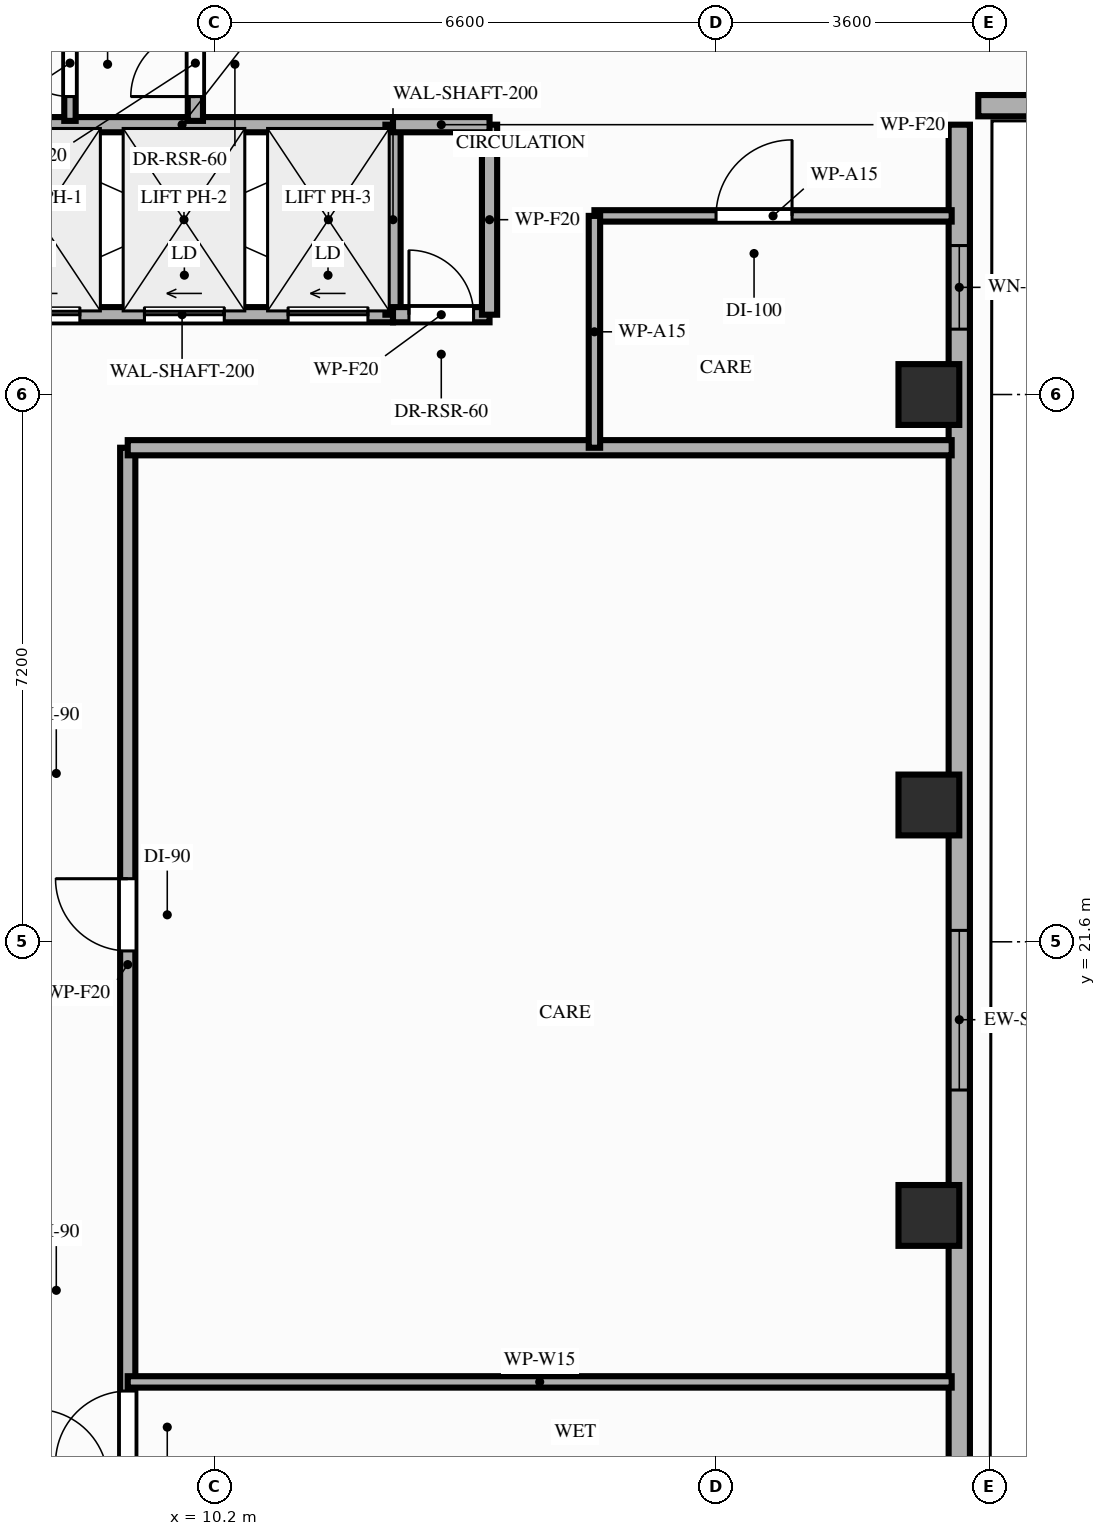
"""IFC4 building model, lengths in metres.
Left out: names, types, materials, properties, quantities, classifications, styles, units other than length and angle.
Written with IfcOpenShell. Run it as: python <this file> out.ifc"""

import sys

from ifc_helpers import new_model, si_unit, direction, frame, frame_2d, origin, origin_2d, place, context, subcontext, project, spatial, rectangle, extrude, element, fill, save


model = new_model("IFC4")
c1 = context("Model", 3, precision=1e-05, world=origin(), true_north=direction((0.0, 1.0)))
c2 = subcontext(c1, "Body", "Model", "MODEL_VIEW")
j1 = project(units=[si_unit("LENGTHUNIT", "METRE"), si_unit("PLANEANGLEUNIT", "RADIAN")], contexts=[c1])
p1 = place(None, origin())
s1 = spatial("IfcSite", under=j1, at=p1, CompositionType="ELEMENT")
p2 = place(p1, origin())
s2 = spatial("IfcBuilding", under=s1, at=p2, CompositionType="ELEMENT")
p3 = place(p2, frame((0.0, 0.0, 231.2)))
s3 = spatial("IfcBuildingStorey", under=s2, at=p3, CompositionType="ELEMENT", Elevation=231.2)
for number, where, z_axis, x_axis in (
    (1, (19.6, 18.0, 0.0), (0.0, 0.0, 1.0), (1.0, 0.0, 0.0)),
    (2, (19.6, 23.4, 0.0), (0.0, 0.0, 1.0), (1.0, 0.0, 0.0)),
    (3, (19.6, 28.8, 0.0), (0.0, 0.0, 1.0), (1.0, 0.0, 0.0)),
):
    element("IfcColumn", number, at=place(p3, frame(where, z_axis=z_axis, x_axis=x_axis)), inside=s3, PredefinedType="COLUMN", context=c2, shape_type="SweptSolid", body=[
        extrude(rectangle(XDim=0.8, YDim=0.8, at=origin_2d()), origin(), (0.0, 0.0, 1.0), 3.2),
    ])
p4 = place(p3, frame((20.0, 8.8, 0.0), z_axis=(0.0, 0.0, 1.0), x_axis=(0.0, 1.0, 0.0)))
e4 = element("IfcWall", 4, at=p4, inside=s3, PredefinedType="STANDARD", context=c2, shape_type="SweptSolid", body=[
    extrude(rectangle(XDim=23.55, YDim=0.28, at=frame_2d((11.775, 0.0))), origin(), (0.0, 0.0, 1.0), 2.56),
])
p5 = place(p4, frame((20.86, 0.0, 0.85)))
e5 = element("IfcOpeningElement", 5, at=p5, cuts=e4, PredefinedType="OPENING", context=c2, shape_type="SweptSolid", body=[
    extrude(rectangle(XDim=1.1, YDim=1.46, at=frame_2d((0.55, 0.73))), frame((0.0, 0.15, 0.0), z_axis=(0.0, -1.0, 0.0), x_axis=(1.0, 0.0, 0.0)), (0.0, 0.0, 1.0), 0.3),
])
p6 = place(p4, frame((4.58, 0.0, 0.85)))
e6 = element("IfcOpeningElement", 6, at=p6, cuts=e4, PredefinedType="OPENING", context=c2, shape_type="SweptSolid", body=[
    extrude(rectangle(XDim=0.8, YDim=1.46, at=frame_2d((0.4, 0.73))), frame((0.0, 0.15, 0.0), z_axis=(0.0, -1.0, 0.0), x_axis=(1.0, 0.0, 0.0)), (0.0, 0.0, 1.0), 0.3),
])
p7 = place(p4, frame((10.85, 0.0, 0.85)))
e7 = element("IfcOpeningElement", 7, at=p7, cuts=e4, PredefinedType="OPENING", context=c2, shape_type="SweptSolid", body=[
    extrude(rectangle(XDim=2.1, YDim=1.46, at=frame_2d((1.05, 0.73))), frame((0.0, 0.15, 0.0), z_axis=(0.0, -1.0, 0.0), x_axis=(1.0, 0.0, 0.0)), (0.0, 0.0, 1.0), 0.3),
])
p8 = place(p3, frame((20.25, 32.6, 0.0), z_axis=(0.0, 0.0, 1.0), x_axis=(1.0, 0.0, 0.0)))
e8 = element("IfcWall", 8, at=p8, inside=s3, PredefinedType="STANDARD", context=c2, shape_type="SweptSolid", body=[
    extrude(rectangle(XDim=7.35, YDim=0.28, at=frame_2d((3.675, 0.0))), origin(), (0.0, 0.0, 1.0), 2.56),
])
p9 = place(p3, frame((7.0, 29.85, 0.0), z_axis=(0.0, 0.0, 1.0), x_axis=(1.0, 0.0, 0.0)))
e9 = element("IfcWall", 9, at=p9, inside=s3, PredefinedType="MOVABLE", context=c2, shape_type="SweptSolid", body=[
    extrude(rectangle(XDim=5.55, YDim=0.2, at=frame_2d((2.775, 0.0))), origin(), (0.0, 0.0, 1.0), 3.02),
])
p10 = place(p9, frame((0.38, 0.0, 0.0)))
e10 = element("IfcOpeningElement", 10, at=p10, cuts=e9, PredefinedType="OPENING", context=c2, shape_type="SweptSolid", body=[
    extrude(rectangle(XDim=1.05, YDim=2.15, at=frame_2d((0.525, 1.075))), frame((0.0, 0.11, 0.0), z_axis=(0.0, -1.0, 0.0), x_axis=(1.0, 0.0, 0.0)), (0.0, 0.0, 1.0), 0.22),
])
p11 = place(p9, frame((2.28, 0.0, 0.0)))
e11 = element("IfcOpeningElement", 11, at=p11, cuts=e9, PredefinedType="OPENING", context=c2, shape_type="SweptSolid", body=[
    extrude(rectangle(XDim=1.05, YDim=2.15, at=frame_2d((0.525, 1.075))), frame((0.0, 0.11, 0.0), z_axis=(0.0, -1.0, 0.0), x_axis=(1.0, 0.0, 0.0)), (0.0, 0.0, 1.0), 0.22),
])
p12 = place(p9, frame((4.17, 0.0, 0.0)))
e12 = element("IfcOpeningElement", 12, at=p12, cuts=e9, PredefinedType="OPENING", context=c2, shape_type="SweptSolid", body=[
    extrude(rectangle(XDim=1.05, YDim=2.15, at=frame_2d((0.525, 1.075))), frame((0.0, 0.11, 0.0), z_axis=(0.0, -1.0, 0.0), x_axis=(1.0, 0.0, 0.0)), (0.0, 0.0, 1.0), 0.22),
])
p13 = place(p3, frame((7.0, 32.35, 0.0), z_axis=(0.0, 0.0, 1.0), x_axis=(1.0, 0.0, 0.0)))
e13 = element("IfcWall", 13, at=p13, inside=s3, PredefinedType="MOVABLE", context=c2, shape_type="SweptSolid", body=[
    extrude(rectangle(XDim=5.55, YDim=0.2, at=frame_2d((2.775, 0.0))), origin(), (0.0, 0.0, 1.0), 3.02),
])
p14 = place(p3, frame((12.55, 29.85, 0.0), z_axis=(0.0, 0.0, 1.0), x_axis=(0.0, 1.0, 0.0)))
e14 = element("IfcWall", 14, at=p14, inside=s3, PredefinedType="MOVABLE", context=c2, shape_type="SweptSolid", body=[
    extrude(rectangle(XDim=2.5, YDim=0.2, at=frame_2d((1.25, 0.0))), origin(), (0.0, 0.0, 1.0), 3.02),
])
p15 = place(p3, frame((9.95, 32.4, 0.0), z_axis=(0.0, 0.0, 1.0), x_axis=(0.0, 1.0, 0.0)))
e15 = element("IfcWall", 15, at=p15, inside=s3, PredefinedType="PARTITIONING", context=c2, shape_type="SweptSolid", body=[
    extrude(rectangle(XDim=1.52, YDim=0.2, at=frame_2d((0.76, 0.0))), origin(), (0.0, 0.0, 1.0), 2.56),
])
p16 = place(p15, frame((0.32, 0.0, 0.0)))
e16 = element("IfcOpeningElement", 16, at=p16, cuts=e15, PredefinedType="OPENING", context=c2, shape_type="SweptSolid", body=[
    extrude(rectangle(XDim=0.85, YDim=2.05, at=frame_2d((0.425, 1.025))), frame((0.0, 0.11, 0.0), z_axis=(0.0, -1.0, 0.0), x_axis=(1.0, 0.0, 0.0)), (0.0, 0.0, 1.0), 0.22),
])
p17 = place(p3, frame((8.3, 32.4, 0.0), z_axis=(0.0, 0.0, 1.0), x_axis=(0.0, 1.0, 0.0)))
e17 = element("IfcWall", 17, at=p17, inside=s3, PredefinedType="PARTITIONING", context=c2, shape_type="SweptSolid", body=[
    extrude(rectangle(XDim=1.52, YDim=0.15, at=frame_2d((0.76, 0.0))), origin(), (0.0, 0.0, 1.0), 2.56),
])
p18 = place(p17, frame((0.32, 0.0, 0.0)))
e18 = element("IfcOpeningElement", 18, at=p18, cuts=e17, PredefinedType="OPENING", context=c2, shape_type="SweptSolid", body=[
    extrude(rectangle(XDim=0.85, YDim=2.05, at=frame_2d((0.425, 1.025))), frame((0.0, 0.085, 0.0), z_axis=(0.0, -1.0, 0.0), x_axis=(1.0, 0.0, 0.0)), (0.0, 0.0, 1.0), 0.17),
])
p19 = place(p3, frame((12.55, 29.85, 0.0), z_axis=(0.0, 0.0, 1.0), x_axis=(1.0, 0.0, 0.0)))
e19 = element("IfcWall", 19, at=p19, inside=s3, PredefinedType="PARTITIONING", context=c2, shape_type="SweptSolid", body=[
    extrude(rectangle(XDim=1.27, YDim=0.2, at=frame_2d((0.635, 0.0))), origin(), (0.0, 0.0, 1.0), 3.02),
])
p20 = place(p19, frame((0.21, 0.0, 0.0)))
e20 = element("IfcOpeningElement", 20, at=p20, cuts=e19, PredefinedType="OPENING", context=c2, shape_type="SweptSolid", body=[
    extrude(rectangle(XDim=0.85, YDim=2.05, at=frame_2d((0.425, 1.025))), frame((0.0, 0.11, 0.0), z_axis=(0.0, -1.0, 0.0), x_axis=(1.0, 0.0, 0.0)), (0.0, 0.0, 1.0), 0.22),
])
p21 = place(p3, frame((13.82, 29.85, 0.0), z_axis=(0.0, 0.0, 1.0), x_axis=(0.0, 1.0, 0.0)))
e21 = element("IfcWall", 21, at=p21, inside=s3, PredefinedType="PARTITIONING", context=c2, shape_type="SweptSolid", body=[
    extrude(rectangle(XDim=2.5, YDim=0.2, at=frame_2d((1.25, 0.0))), origin(), (0.0, 0.0, 1.0), 3.02),
])
p22 = place(p3, frame((12.55, 32.35, 0.0), z_axis=(0.0, 0.0, 1.0), x_axis=(1.0, 0.0, 0.0)))
e22 = element("IfcWall", 22, at=p22, inside=s3, PredefinedType="PARTITIONING", context=c2, shape_type="SweptSolid", body=[
    extrude(rectangle(XDim=1.27, YDim=0.2, at=frame_2d((0.635, 0.0))), origin(), (0.0, 0.0, 1.0), 3.02),
])
p23 = place(p3, frame((9.06, 14.5, 0.0), z_axis=(0.0, 0.0, 1.0), x_axis=(0.0, 1.0, 0.0)))
e23 = element("IfcWall", 23, at=p23, inside=s3, PredefinedType="PARTITIONING", context=c2, shape_type="SweptSolid", body=[
    extrude(rectangle(XDim=13.6, YDim=0.2, at=frame_2d((6.8, 0.0))), origin(), (0.0, 0.0, 1.0), 2.56),
])
p24 = place(p23, frame((0.24, 0.0, 0.0)))
e24 = element("IfcOpeningElement", 24, at=p24, cuts=e23, PredefinedType="OPENING", context=c2, shape_type="SweptSolid", body=[
    extrude(rectangle(XDim=0.95, YDim=2.1, at=frame_2d((0.475, 1.05))), frame((0.0, 0.11, 0.0), z_axis=(0.0, -1.0, 0.0), x_axis=(1.0, 0.0, 0.0)), (0.0, 0.0, 1.0), 0.22),
])
p25 = place(p23, frame((6.98, 0.0, 0.0)))
e25 = element("IfcOpeningElement", 25, at=p25, cuts=e23, PredefinedType="OPENING", context=c2, shape_type="SweptSolid", body=[
    extrude(rectangle(XDim=0.95, YDim=2.15, at=frame_2d((0.475, 1.075))), frame((0.0, 0.11, 0.0), z_axis=(0.0, -1.0, 0.0), x_axis=(1.0, 0.0, 0.0)), (0.0, 0.0, 1.0), 0.22),
])
p26 = place(p3, frame((9.06, 28.1, 0.0), z_axis=(0.0, 0.0, 1.0), x_axis=(1.0, 0.0, 0.0)))
e26 = element("IfcWall", 26, at=p26, inside=s3, PredefinedType="PARTITIONING", context=c2, shape_type="SweptSolid", body=[
    extrude(rectangle(XDim=10.84, YDim=0.2, at=frame_2d((5.42, 0.0))), origin(), (0.0, 0.0, 1.0), 2.56),
])
p27 = place(p3, frame((15.2, 31.15, 0.0), z_axis=(0.0, 0.0, 1.0), x_axis=(1.0, 0.0, 0.0)))
e27 = element("IfcWall", 27, at=p27, inside=s3, PredefinedType="PARTITIONING", context=c2, shape_type="SweptSolid", body=[
    extrude(rectangle(XDim=4.7, YDim=0.15, at=frame_2d((2.35, 0.0))), origin(), (0.0, 0.0, 1.0), 2.56),
])
p28 = place(p27, frame((1.6, 0.0, 0.0)))
e28 = element("IfcOpeningElement", 28, at=p28, cuts=e27, PredefinedType="OPENING", context=c2, shape_type="SweptSolid", body=[
    extrude(rectangle(XDim=1.0, YDim=2.15, at=frame_2d((0.5, 1.075))), frame((0.0, 0.085, 0.0), z_axis=(0.0, -1.0, 0.0), x_axis=(1.0, 0.0, 0.0)), (0.0, 0.0, 1.0), 0.17),
])
p29 = place(p3, frame((15.2, 28.1, 0.0), z_axis=(0.0, 0.0, 1.0), x_axis=(0.0, 1.0, 0.0)))
e29 = element("IfcWall", 29, at=p29, inside=s3, PredefinedType="PARTITIONING", context=c2, shape_type="SweptSolid", body=[
    extrude(rectangle(XDim=3.05, YDim=0.15, at=frame_2d((1.525, 0.0))), origin(), (0.0, 0.0, 1.0), 2.56),
])
p30 = place(p3, frame((9.06, 15.81, 0.0), z_axis=(0.0, 0.0, 1.0), x_axis=(1.0, 0.0, 0.0)))
e30 = element("IfcWall", 30, at=p30, inside=s3, PredefinedType="PARTITIONING", context=c2, shape_type="SweptSolid", body=[
    extrude(rectangle(XDim=10.84, YDim=0.15, at=frame_2d((5.42, 0.0))), origin(), (0.0, 0.0, 1.0), 2.56),
])
p31 = place(p5, origin())
e31 = element("IfcWindow", 31, at=p31, inside=s3, PartitioningType="SINGLE_PANEL", PredefinedType="WINDOW", context=c2, shape_type="SweptSolid", body=[
    extrude(rectangle(XDim=1.1, YDim=1.46, at=frame_2d((0.55, 0.73))), frame((0.0, 0.03, 0.0), z_axis=(0.0, -1.0, 0.0), x_axis=(1.0, 0.0, 0.0)), (0.0, 0.0, 1.0), 0.06),
])
fill(e5, e31)
p32 = place(p7, origin())
e32 = element("IfcWindow", 32, at=p32, inside=s3, PartitioningType="SINGLE_PANEL", PredefinedType="WINDOW", context=c2, shape_type="SweptSolid", body=[
    extrude(rectangle(XDim=2.1, YDim=1.46, at=frame_2d((1.05, 0.73))), frame((0.0, 0.03, 0.0), z_axis=(0.0, -1.0, 0.0), x_axis=(1.0, 0.0, 0.0)), (0.0, 0.0, 1.0), 0.06),
])
fill(e7, e32)
p33 = place(p10, origin())
e33 = element("IfcDoor", 33, at=p33, inside=s3, OperationType="SLIDING_TO_LEFT", PredefinedType="DOOR", context=c2, shape_type="SweptSolid", body=[
    extrude(rectangle(XDim=1.05, YDim=2.15, at=frame_2d((0.525, 1.075))), frame((0.0, 0.025, 0.0), z_axis=(0.0, -1.0, 0.0), x_axis=(1.0, 0.0, 0.0)), (0.0, 0.0, 1.0), 0.05),
])
fill(e10, e33)
p34 = place(p11, origin())
e34 = element("IfcDoor", 34, at=p34, inside=s3, OperationType="SLIDING_TO_LEFT", PredefinedType="DOOR", context=c2, shape_type="SweptSolid", body=[
    extrude(rectangle(XDim=1.05, YDim=2.15, at=frame_2d((0.525, 1.075))), frame((0.0, 0.025, 0.0), z_axis=(0.0, -1.0, 0.0), x_axis=(1.0, 0.0, 0.0)), (0.0, 0.0, 1.0), 0.05),
])
fill(e11, e34)
p35 = place(p12, origin())
e35 = element("IfcDoor", 35, at=p35, inside=s3, OperationType="SLIDING_TO_LEFT", PredefinedType="DOOR", context=c2, shape_type="SweptSolid", body=[
    extrude(rectangle(XDim=1.05, YDim=2.15, at=frame_2d((0.525, 1.075))), frame((0.0, 0.025, 0.0), z_axis=(0.0, -1.0, 0.0), x_axis=(1.0, 0.0, 0.0)), (0.0, 0.0, 1.0), 0.05),
])
fill(e12, e35)
p36 = place(p16, origin())
e36 = element("IfcDoor", 36, at=p36, inside=s3, OperationType="SINGLE_SWING_LEFT", PredefinedType="DOOR", context=c2, shape_type="SweptSolid", body=[
    extrude(rectangle(XDim=0.85, YDim=2.05, at=frame_2d((0.425, 1.025))), frame((0.0, 0.025, 0.0), z_axis=(0.0, -1.0, 0.0), x_axis=(1.0, 0.0, 0.0)), (0.0, 0.0, 1.0), 0.05),
])
fill(e16, e36)
p37 = place(p18, origin())
e37 = element("IfcDoor", 37, at=p37, inside=s3, OperationType="SINGLE_SWING_RIGHT", PredefinedType="DOOR", context=c2, shape_type="SweptSolid", body=[
    extrude(rectangle(XDim=0.85, YDim=2.05, at=frame_2d((0.425, 1.025))), frame((0.0, 0.025, 0.0), z_axis=(0.0, -1.0, 0.0), x_axis=(1.0, 0.0, 0.0)), (0.0, 0.0, 1.0), 0.05),
])
fill(e18, e37)
p38 = place(p20, origin())
e38 = element("IfcDoor", 38, at=p38, inside=s3, OperationType="SINGLE_SWING_LEFT", PredefinedType="DOOR", context=c2, shape_type="SweptSolid", body=[
    extrude(rectangle(XDim=0.85, YDim=2.05, at=frame_2d((0.425, 1.025))), frame((0.0, 0.025, 0.0), z_axis=(0.0, -1.0, 0.0), x_axis=(1.0, 0.0, 0.0)), (0.0, 0.0, 1.0), 0.05),
])
fill(e20, e38)
p39 = place(p28, origin())
e39 = element("IfcDoor", 39, at=p39, inside=s3, OperationType="SINGLE_SWING_RIGHT", PredefinedType="DOOR", context=c2, shape_type="SweptSolid", body=[
    extrude(rectangle(XDim=1.0, YDim=2.15, at=frame_2d((0.5, 1.075))), frame((0.0, 0.025, 0.0), z_axis=(0.0, -1.0, 0.0), x_axis=(1.0, 0.0, 0.0)), (0.0, 0.0, 1.0), 0.05),
])
fill(e28, e39)
p40 = place(p24, origin())
e40 = element("IfcDoor", 40, at=p40, inside=s3, OperationType="SINGLE_SWING_LEFT", PredefinedType="DOOR", context=c2, shape_type="SweptSolid", body=[
    extrude(rectangle(XDim=0.95, YDim=2.1, at=frame_2d((0.475, 1.05))), frame((0.0, 0.025, 0.0), z_axis=(0.0, -1.0, 0.0), x_axis=(1.0, 0.0, 0.0)), (0.0, 0.0, 1.0), 0.05),
])
fill(e24, e40)
p41 = place(p25, origin())
e41 = element("IfcDoor", 41, at=p41, inside=s3, OperationType="SINGLE_SWING_RIGHT", PredefinedType="DOOR", context=c2, shape_type="SweptSolid", body=[
    extrude(rectangle(XDim=0.95, YDim=2.15, at=frame_2d((0.475, 1.075))), frame((0.0, 0.025, 0.0), z_axis=(0.0, -1.0, 0.0), x_axis=(1.0, 0.0, 0.0)), (0.0, 0.0, 1.0), 0.05),
])
fill(e25, e41)
save(model, sys.argv[1])
